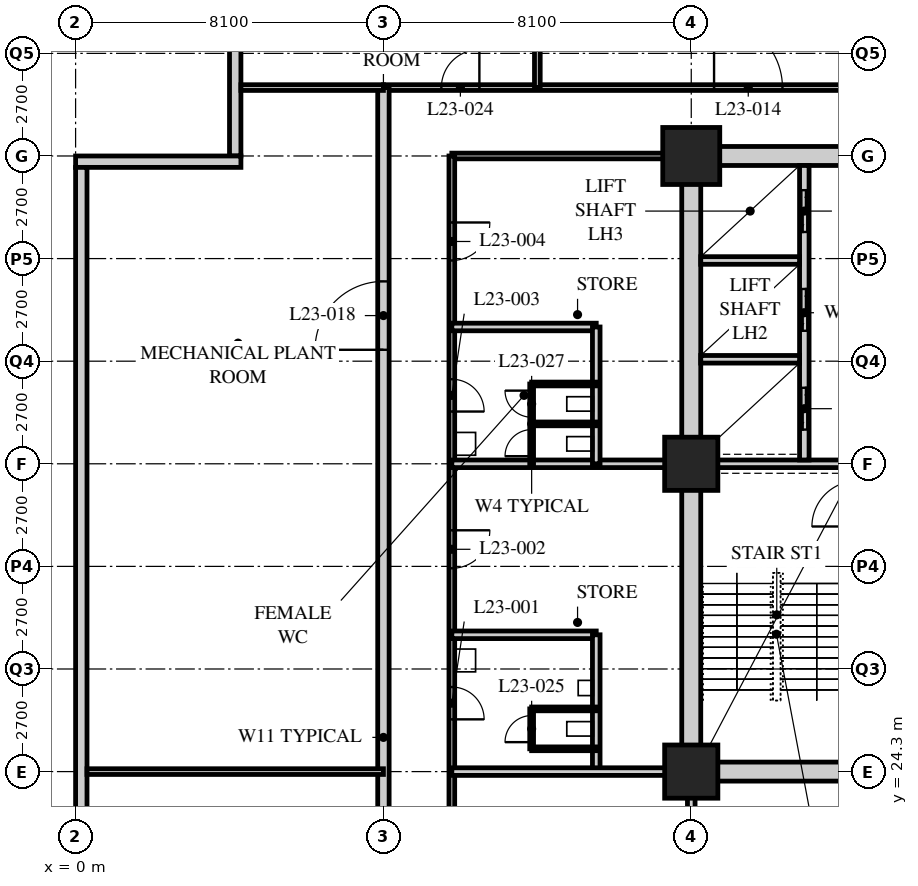
"""IFC4 building model, lengths in metres.
Left out: names, types, materials, properties, quantities, classifications, styles, units other than length and angle.
Written with IfcOpenShell. Run it as: python <this file> out.ifc"""

import sys

from ifc_helpers import new_model, si_unit, direction, frame, frame_2d, origin, origin_2d, place, context, subcontext, project, spatial, rectangle, hollow_rectangle, extrude, element, fill, save


model = new_model("IFC4")
c1 = context("Model", 3, precision=1e-05, world=origin(), true_north=direction((0.0, 1.0)))
c2 = subcontext(c1, "Body", "Model", "MODEL_VIEW")
j1 = project(units=[si_unit("LENGTHUNIT", "METRE"), si_unit("PLANEANGLEUNIT", "RADIAN")], contexts=[c1])
p1 = place(None, origin())
s1 = spatial("IfcSite", under=j1, at=p1, CompositionType="ELEMENT")
p2 = place(p1, origin())
s2 = spatial("IfcBuilding", under=s1, at=p2, CompositionType="ELEMENT")
p3 = place(p2, frame((0.0, 0.0, 90.8)))
s3 = spatial("IfcBuildingStorey", under=s2, at=p3, CompositionType="ELEMENT", Elevation=90.8)
for number, where, z_axis, x_axis in (
    (1, (16.2, 24.3, 0.0), (0.0, 0.0, 1.0), (1.0, 0.0, 0.0)),
    (2, (16.2, 32.4, 0.0), (0.0, 0.0, 1.0), (1.0, 0.0, 0.0)),
):
    element("IfcColumn", number, at=place(p3, frame(where, z_axis=z_axis, x_axis=x_axis)), inside=s3, PredefinedType="COLUMN", context=c2, shape_type="SweptSolid", body=[
        extrude(hollow_rectangle(XDim=1.4, YDim=1.4, WallThickness=0.12, at=origin_2d()), origin(), (0.0, 0.0, 1.0), 7.2),
    ])
p4 = place(p3, frame((16.2, 40.5, 0.0), z_axis=(0.0, 0.0, 1.0), x_axis=(1.0, 0.0, 0.0)))
e3 = element("IfcColumn", 3, at=p4, inside=s3, PredefinedType="COLUMN", context=c2, shape_type="SweptSolid", body=[
    extrude(hollow_rectangle(XDim=1.5, YDim=1.5, WallThickness=0.13, at=origin_2d()), origin(), (0.0, 0.0, 1.0), 7.2),
])
p5 = place(p3, frame((4.2, 44.25, 0.0), z_axis=(0.0, 0.0, 1.0), x_axis=(0.0, -1.0, 0.0)))
e4 = element("IfcWall", 4, at=p5, inside=s3, PredefinedType="SOLIDWALL", context=c2, shape_type="SweptSolid", body=[
    extrude(rectangle(XDim=3.75, YDim=0.3, at=frame_2d((1.875, 0.0))), origin(), (0.0, 0.0, 1.0), 6.95),
])
p6 = place(p3, frame((4.35, 40.35, 0.0), z_axis=(0.0, 0.0, 1.0), x_axis=(-1.0, 0.0, 0.0)))
e5 = element("IfcWall", 5, at=p6, inside=s3, PredefinedType="SOLIDWALL", context=c2, shape_type="SweptSolid", body=[
    extrude(rectangle(XDim=4.35, YDim=0.3, at=frame_2d((2.175, 0.0))), origin(), (0.0, 0.0, 1.0), 5.85),
])
p7 = place(p3, frame((0.15, 40.2, 0.0), z_axis=(0.0, 0.0, 1.0), x_axis=(0.0, -1.0, 0.0)))
e6 = element("IfcWall", 6, at=p7, inside=s3, PredefinedType="SOLIDWALL", context=c2, shape_type="SweptSolid", body=[
    extrude(rectangle(XDim=32.1, YDim=0.3, at=frame_2d((16.05, 0.0))), origin(), (0.0, 0.0, 1.0), 5.85),
])
p8 = place(p3, frame((8.1, 42.3, 0.0), z_axis=(0.0, 0.0, 1.0), x_axis=(1.0, 0.0, 0.0)))
e7 = element("IfcWall", 7, at=p8, inside=s3, PredefinedType="PARTITIONING", context=c2, shape_type="SweptSolid", body=[
    extrude(rectangle(XDim=40.5, YDim=0.15, at=frame_2d((20.25, 0.0))), origin(), (0.0, 0.0, 1.0), 6.95),
])
p9 = place(p8, frame((8.7, 0.0, 0.0)))
e8 = element("IfcOpeningElement", 8, at=p9, cuts=e7, PredefinedType="OPENING", context=c2, shape_type="SweptSolid", body=[
    extrude(rectangle(XDim=1.8, YDim=2.4, at=frame_2d((0.9, 1.2))), frame((0.0, 0.085, 0.0), z_axis=(0.0, -1.0, 0.0), x_axis=(1.0, 0.0, 0.0)), (0.0, 0.0, 1.0), 0.17),
])
p10 = place(p8, frame((19.35, 0.0, 0.0)))
e9 = element("IfcOpeningElement", 9, at=p10, cuts=e7, PredefinedType="OPENING", context=c2, shape_type="SweptSolid", body=[
    extrude(rectangle(XDim=1.8, YDim=2.4, at=frame_2d((0.9, 1.2))), frame((0.0, 0.085, 0.0), z_axis=(0.0, -1.0, 0.0), x_axis=(1.0, 0.0, 0.0)), (0.0, 0.0, 1.0), 0.17),
])
p11 = place(p8, frame((33.0, 0.0, 0.0)))
e10 = element("IfcOpeningElement", 10, at=p11, cuts=e7, PredefinedType="OPENING", context=c2, shape_type="SweptSolid", body=[
    extrude(rectangle(XDim=1.8, YDim=2.4, at=frame_2d((0.9, 1.2))), frame((0.0, 0.085, 0.0), z_axis=(0.0, -1.0, 0.0), x_axis=(1.0, 0.0, 0.0)), (0.0, 0.0, 1.0), 0.17),
])
p12 = place(p8, frame((37.975, 0.0, 0.0)))
e11 = element("IfcOpeningElement", 11, at=p12, cuts=e7, PredefinedType="OPENING", context=c2, shape_type="SweptSolid", body=[
    extrude(rectangle(XDim=1.0, YDim=2.1, at=frame_2d((0.5, 1.05))), frame((0.0, 0.085, 0.0), z_axis=(0.0, -1.0, 0.0), x_axis=(1.0, 0.0, 0.0)), (0.0, 0.0, 1.0), 0.17),
])
p13 = place(p8, frame((1.525, 0.0, 0.0)))
e12 = element("IfcOpeningElement", 12, at=p13, cuts=e7, PredefinedType="OPENING", context=c2, shape_type="SweptSolid", body=[
    extrude(rectangle(XDim=1.0, YDim=2.1, at=frame_2d((0.5, 1.05))), frame((0.0, 0.085, 0.0), z_axis=(0.0, -1.0, 0.0), x_axis=(1.0, 0.0, 0.0)), (0.0, 0.0, 1.0), 0.17),
])
p14 = place(p3, frame((8.1, 8.1, 0.0), z_axis=(0.0, 0.0, 1.0), x_axis=(0.0, 1.0, 0.0)))
e13 = element("IfcWall", 13, at=p14, inside=s3, PredefinedType="PARTITIONING", context=c2, shape_type="SweptSolid", body=[
    extrude(rectangle(XDim=34.2, YDim=0.3, at=frame_2d((17.1, 0.0))), origin(), (0.0, 0.0, 1.0), 5.85),
])
p15 = place(p14, frame((2.95, 0.0, 0.0)))
e14 = element("IfcOpeningElement", 14, at=p15, cuts=e13, PredefinedType="OPENING", context=c2, shape_type="SweptSolid", body=[
    extrude(rectangle(XDim=1.8, YDim=2.4, at=frame_2d((0.9, 1.2))), frame((0.0, 0.16, 0.0), z_axis=(0.0, -1.0, 0.0), x_axis=(1.0, 0.0, 0.0)), (0.0, 0.0, 1.0), 0.32),
])
p16 = place(p14, frame((27.3, 0.0, 0.0)))
e15 = element("IfcOpeningElement", 15, at=p16, cuts=e13, PredefinedType="OPENING", context=c2, shape_type="SweptSolid", body=[
    extrude(rectangle(XDim=1.8, YDim=2.4, at=frame_2d((0.9, 1.2))), frame((0.0, 0.16, 0.0), z_axis=(0.0, -1.0, 0.0), x_axis=(1.0, 0.0, 0.0)), (0.0, 0.0, 1.0), 0.32),
])
p17 = place(p3, frame((16.0, 40.5, 0.0), z_axis=(0.0, 0.0, 1.0), x_axis=(-1.0, 0.0, 0.0)))
e16 = element("IfcWall", 16, at=p17, inside=s3, PredefinedType="PARTITIONING", context=c2, shape_type="SweptSolid", body=[
    extrude(rectangle(XDim=6.1, YDim=0.15, at=frame_2d((3.05, 0.0))), origin(), (0.0, 0.0, 1.0), 5.85),
])
p18 = place(p3, frame((9.9, 40.5, 0.0), z_axis=(0.0, 0.0, 1.0), x_axis=(0.0, -1.0, 0.0)))
e17 = element("IfcWall", 17, at=p18, inside=s3, PredefinedType="PARTITIONING", context=c2, shape_type="SweptSolid", body=[
    extrude(rectangle(XDim=30.6, YDim=0.15, at=frame_2d((15.3, 0.0))), origin(), (0.0, 0.0, 1.0), 6.95),
])
p19 = place(p18, frame((13.975, 0.0, 0.0)))
e18 = element("IfcOpeningElement", 18, at=p19, cuts=e17, PredefinedType="OPENING", context=c2, shape_type="SweptSolid", body=[
    extrude(rectangle(XDim=0.85, YDim=2.1, at=frame_2d((0.425, 1.05))), frame((0.0, 0.085, 0.0), z_axis=(0.0, -1.0, 0.0), x_axis=(1.0, 0.0, 0.0)), (0.0, 0.0, 1.0), 0.17),
])
p20 = place(p18, frame((9.85, 0.0, 0.0)))
e19 = element("IfcOpeningElement", 19, at=p20, cuts=e17, PredefinedType="OPENING", context=c2, shape_type="SweptSolid", body=[
    extrude(rectangle(XDim=1.0, YDim=2.1, at=frame_2d((0.5, 1.05))), frame((0.0, 0.085, 0.0), z_axis=(0.0, -1.0, 0.0), x_axis=(1.0, 0.0, 0.0)), (0.0, 0.0, 1.0), 0.17),
])
p21 = place(p18, frame((5.875, 0.0, 0.0)))
e20 = element("IfcOpeningElement", 20, at=p21, cuts=e17, PredefinedType="OPENING", context=c2, shape_type="SweptSolid", body=[
    extrude(rectangle(XDim=0.85, YDim=2.1, at=frame_2d((0.425, 1.05))), frame((0.0, 0.085, 0.0), z_axis=(0.0, -1.0, 0.0), x_axis=(1.0, 0.0, 0.0)), (0.0, 0.0, 1.0), 0.17),
])
p22 = place(p18, frame((1.75, 0.0, 0.0)))
e21 = element("IfcOpeningElement", 21, at=p22, cuts=e17, PredefinedType="OPENING", context=c2, shape_type="SweptSolid", body=[
    extrude(rectangle(XDim=1.0, YDim=2.1, at=frame_2d((0.5, 1.05))), frame((0.0, 0.085, 0.0), z_axis=(0.0, -1.0, 0.0), x_axis=(1.0, 0.0, 0.0)), (0.0, 0.0, 1.0), 0.17),
])
p23 = place(p3, frame((9.9, 32.4, 0.0), z_axis=(0.0, 0.0, 1.0), x_axis=(1.0, 0.0, 0.0)))
e22 = element("IfcWall", 22, at=p23, inside=s3, PredefinedType="SOLIDWALL", context=c2, shape_type="SweptSolid", body=[
    extrude(rectangle(XDim=6.3, YDim=0.2, at=frame_2d((3.15, 0.0))), origin(), (0.0, 0.0, 1.0), 6.95),
])
p24 = place(p3, frame((9.9, 27.9, 0.0), z_axis=(0.0, 0.0, 1.0), x_axis=(1.0, 0.0, 0.0)))
e23 = element("IfcWall", 23, at=p24, inside=s3, PredefinedType="SOLIDWALL", context=c2, shape_type="SweptSolid", body=[
    extrude(rectangle(XDim=3.8, YDim=0.2, at=frame_2d((1.9, 0.0))), origin(), (0.0, 0.0, 1.0), 6.95),
])
p25 = place(p3, frame((13.7, 24.3, 0.0), z_axis=(0.0, 0.0, 1.0), x_axis=(0.0, 1.0, 0.0)))
e24 = element("IfcWall", 24, at=p25, inside=s3, PredefinedType="SOLIDWALL", context=c2, shape_type="SweptSolid", body=[
    extrude(rectangle(XDim=3.6, YDim=0.2, at=frame_2d((1.8, 0.0))), origin(), (0.0, 0.0, 1.0), 6.95),
])
p26 = place(p3, frame((9.9, 36.0, 0.0), z_axis=(0.0, 0.0, 1.0), x_axis=(1.0, 0.0, 0.0)))
e25 = element("IfcWall", 25, at=p26, inside=s3, PredefinedType="SOLIDWALL", context=c2, shape_type="SweptSolid", body=[
    extrude(rectangle(XDim=3.8, YDim=0.2, at=frame_2d((1.9, 0.0))), origin(), (0.0, 0.0, 1.0), 6.95),
])
p27 = place(p3, frame((13.7, 32.4, 0.0), z_axis=(0.0, 0.0, 1.0), x_axis=(0.0, 1.0, 0.0)))
e26 = element("IfcWall", 26, at=p27, inside=s3, PredefinedType="SOLIDWALL", context=c2, shape_type="SweptSolid", body=[
    extrude(rectangle(XDim=3.6, YDim=0.2, at=frame_2d((1.8, 0.0))), origin(), (0.0, 0.0, 1.0), 6.95),
])
p28 = place(p3, frame((16.2, 9.9, 0.0), z_axis=(0.0, 0.0, 1.0), x_axis=(0.0, 1.0, 0.0)))
e27 = element("IfcWall", 27, at=p28, inside=s3, PredefinedType="SOLIDWALL", context=c2, shape_type="SweptSolid", body=[
    extrude(rectangle(XDim=14.4, YDim=0.2, at=frame_2d((7.2, 0.0))), origin(), (0.0, 0.0, 1.0), 5.85),
])
p29 = place(p3, frame((9.9, 24.3, 0.0), z_axis=(0.0, 0.0, 1.0), x_axis=(1.0, 0.0, 0.0)))
e28 = element("IfcWall", 28, at=p29, inside=s3, PredefinedType="SOLIDWALL", context=c2, shape_type="SweptSolid", body=[
    extrude(rectangle(XDim=6.3, YDim=0.2, at=frame_2d((3.15, 0.0))), origin(), (0.0, 0.0, 1.0), 5.85),
])
p30 = place(p3, frame((8.1, 24.3, 0.0), z_axis=(0.0, 0.0, 1.0), x_axis=(-1.0, 0.0, 0.0)))
e29 = element("IfcWall", 29, at=p30, inside=s3, PredefinedType="PARTITIONING", context=c2, shape_type="SweptSolid", body=[
    extrude(rectangle(XDim=7.8, YDim=0.15, at=frame_2d((3.9, 0.0))), origin(), (0.0, 0.0, 1.0), 5.85),
])
p31 = place(p3, frame((4.35, 42.3, 0.0), z_axis=(0.0, 0.0, 1.0), x_axis=(1.0, 0.0, 0.0)))
e30 = element("IfcWall", 30, at=p31, inside=s3, PredefinedType="PARTITIONING", context=c2, shape_type="SweptSolid", body=[
    extrude(rectangle(XDim=3.75, YDim=0.15, at=frame_2d((1.875, 0.0))), origin(), (0.0, 0.0, 1.0), 6.95),
])
p32 = place(p3, frame((12.15, 42.3, 0.0), z_axis=(0.0, 0.0, 1.0), x_axis=(0.0, 1.0, 0.0)))
e31 = element("IfcWall", 31, at=p32, inside=s3, PredefinedType="PARTITIONING", context=c2, shape_type="SweptSolid", body=[
    extrude(rectangle(XDim=6.0, YDim=0.15, at=frame_2d((3.0, 0.0))), origin(), (0.0, 0.0, 1.0), 6.95),
])
p33 = place(p3, frame((12.0, 24.9, 0.0), z_axis=(0.0, 0.0, 1.0), x_axis=(0.0, 1.0, 0.0)))
e32 = element("IfcWall", 32, at=p33, inside=s3, PredefinedType="PARTITIONING", context=c2, shape_type="SweptSolid", body=[
    extrude(rectangle(XDim=1.05, YDim=0.1, at=frame_2d((0.525, 0.0))), origin(), (0.0, 0.0, 1.0), 6.95),
])
p34 = place(p33, frame((0.175, 0.0, 0.0)))
e33 = element("IfcOpeningElement", 33, at=p34, cuts=e32, PredefinedType="OPENING", context=c2, shape_type="SweptSolid", body=[
    extrude(rectangle(XDim=0.7, YDim=2.0, at=frame_2d((0.35, 1.0))), frame((0.0, 0.06, 0.0), z_axis=(0.0, -1.0, 0.0), x_axis=(1.0, 0.0, 0.0)), (0.0, 0.0, 1.0), 0.12),
])
for number, where, z_axis, x_axis in (
    (34, (12.0, 24.9, 0.0), (0.0, 0.0, 1.0), (1.0, 0.0, 0.0)),
    (35, (12.0, 25.95, 0.0), (0.0, 0.0, 1.0), (1.0, 0.0, 0.0)),
):
    element("IfcWall", number, at=place(p3, frame(where, z_axis=z_axis, x_axis=x_axis)), inside=s3, PredefinedType="PARTITIONING", context=c2, shape_type="SweptSolid", body=[
        extrude(rectangle(XDim=1.7, YDim=0.1, at=frame_2d((0.85, 0.0))), origin(), (0.0, 0.0, 1.0), 6.95),
    ])
p35 = place(p3, frame((12.0, 32.4, 0.0), z_axis=(0.0, 0.0, 1.0), x_axis=(0.0, 1.0, 0.0)))
e36 = element("IfcWall", 36, at=p35, inside=s3, PredefinedType="PARTITIONING", context=c2, shape_type="SweptSolid", body=[
    extrude(rectangle(XDim=2.1, YDim=0.1, at=frame_2d((1.05, 0.0))), origin(), (0.0, 0.0, 1.0), 6.95),
])
p36 = place(p35, frame((0.2, 0.0, 0.0)))
e37 = element("IfcOpeningElement", 37, at=p36, cuts=e36, PredefinedType="OPENING", context=c2, shape_type="SweptSolid", body=[
    extrude(rectangle(XDim=0.7, YDim=2.0, at=frame_2d((0.35, 1.0))), frame((0.0, 0.06, 0.0), z_axis=(0.0, -1.0, 0.0), x_axis=(1.0, 0.0, 0.0)), (0.0, 0.0, 1.0), 0.12),
])
p37 = place(p35, frame((1.225, 0.0, 0.0)))
e38 = element("IfcOpeningElement", 38, at=p37, cuts=e36, PredefinedType="OPENING", context=c2, shape_type="SweptSolid", body=[
    extrude(rectangle(XDim=0.7, YDim=2.0, at=frame_2d((0.35, 1.0))), frame((0.0, 0.06, 0.0), z_axis=(0.0, -1.0, 0.0), x_axis=(1.0, 0.0, 0.0)), (0.0, 0.0, 1.0), 0.12),
])
for number, where, z_axis, x_axis in (
    (39, (12.0, 33.45, 0.0), (0.0, 0.0, 1.0), (1.0, 0.0, 0.0)),
    (40, (12.0, 34.5, 0.0), (0.0, 0.0, 1.0), (1.0, 0.0, 0.0)),
):
    element("IfcWall", number, at=place(p3, frame(where, z_axis=z_axis, x_axis=x_axis)), inside=s3, PredefinedType="PARTITIONING", context=c2, shape_type="SweptSolid", body=[
        extrude(rectangle(XDim=1.7, YDim=0.1, at=frame_2d((0.85, 0.0))), origin(), (0.0, 0.0, 1.0), 6.95),
    ])
p38 = place(p3, frame((15.95, 24.3, 0.0), z_axis=(0.0, 0.0, 1.0), x_axis=(1.0, 0.0, 0.0)))
e41 = element("IfcWall", 41, at=p38, inside=s3, PredefinedType="SOLIDWALL", context=c2, shape_type="SweptSolid", body=[
    extrude(rectangle(XDim=24.8, YDim=0.5, at=frame_2d((12.4, 0.0))), origin(), (0.0, 0.0, 1.0), 6.188),
])
p39 = place(p38, frame((11.5, 0.0, 0.0)))
e42 = element("IfcOpeningElement", 42, at=p39, cuts=e41, PredefinedType="OPENING", context=c2, shape_type="SweptSolid", body=[
    extrude(rectangle(XDim=1.8, YDim=2.4, at=frame_2d((0.9, 1.2))), frame((0.0, 0.26, 0.0), z_axis=(0.0, -1.0, 0.0), x_axis=(1.0, 0.0, 0.0)), (0.0, 0.0, 1.0), 0.52),
])
p40 = place(p3, frame((15.95, 40.5, 0.0), z_axis=(0.0, 0.0, 1.0), x_axis=(1.0, 0.0, 0.0)))
e43 = element("IfcWall", 43, at=p40, inside=s3, PredefinedType="SOLIDWALL", context=c2, shape_type="SweptSolid", body=[
    extrude(rectangle(XDim=24.8, YDim=0.5, at=frame_2d((12.4, 0.0))), origin(), (0.0, 0.0, 1.0), 6.188),
])
p41 = place(p40, frame((11.5, 0.0, 0.0)))
e44 = element("IfcOpeningElement", 44, at=p41, cuts=e43, PredefinedType="OPENING", context=c2, shape_type="SweptSolid", body=[
    extrude(rectangle(XDim=1.8, YDim=2.4, at=frame_2d((0.9, 1.2))), frame((0.0, 0.26, 0.0), z_axis=(0.0, -1.0, 0.0), x_axis=(1.0, 0.0, 0.0)), (0.0, 0.0, 1.0), 0.52),
])
p42 = place(p3, frame((16.2, 24.55, 0.0), z_axis=(0.0, 0.0, 1.0), x_axis=(0.0, 1.0, 0.0)))
e45 = element("IfcWall", 45, at=p42, inside=s3, PredefinedType="SOLIDWALL", context=c2, shape_type="SweptSolid", body=[
    extrude(rectangle(XDim=15.7, YDim=0.5, at=frame_2d((7.85, 0.0))), origin(), (0.0, 0.0, 1.0), 5.85),
])
p43 = place(p3, frame((16.45, 32.4, 0.0), z_axis=(0.0, 0.0, 1.0), x_axis=(1.0, 0.0, 0.0)))
e46 = element("IfcWall", 46, at=p43, inside=s3, PredefinedType="SOLIDWALL", context=c2, shape_type="SweptSolid", body=[
    extrude(rectangle(XDim=7.95, YDim=0.2, at=frame_2d((3.975, 0.0))), origin(), (0.0, 0.0, 1.0), 6.25),
])
p44 = place(p3, frame((19.175, 32.5, 0.0), z_axis=(0.0, 0.0, 1.0), x_axis=(0.0, 1.0, 0.0)))
e47 = element("IfcWall", 47, at=p44, inside=s3, PredefinedType="SOLIDWALL", context=c2, shape_type="SweptSolid", body=[
    extrude(rectangle(XDim=7.75, YDim=0.25, at=frame_2d((3.875, 0.0))), origin(), (0.0, 0.0, 1.0), 6.95),
])
p45 = place(p44, frame((0.8, 0.0, 0.0)))
e48 = element("IfcOpeningElement", 48, at=p45, cuts=e47, PredefinedType="OPENING", context=c2, shape_type="SweptSolid", body=[
    extrude(rectangle(XDim=1.1, YDim=2.4, at=frame_2d((0.55, 1.2))), frame((0.0, 0.135, 0.0), z_axis=(0.0, -1.0, 0.0), x_axis=(1.0, 0.0, 0.0)), (0.0, 0.0, 1.0), 0.27),
])
p46 = place(p44, frame((3.4, 0.0, 0.0)))
e49 = element("IfcOpeningElement", 49, at=p46, cuts=e47, PredefinedType="OPENING", context=c2, shape_type="SweptSolid", body=[
    extrude(rectangle(XDim=1.1, YDim=2.4, at=frame_2d((0.55, 1.2))), frame((0.0, 0.135, 0.0), z_axis=(0.0, -1.0, 0.0), x_axis=(1.0, 0.0, 0.0)), (0.0, 0.0, 1.0), 0.27),
])
p47 = place(p44, frame((6.0, 0.0, 0.0)))
e50 = element("IfcOpeningElement", 50, at=p47, cuts=e47, PredefinedType="OPENING", context=c2, shape_type="SweptSolid", body=[
    extrude(rectangle(XDim=1.1, YDim=2.4, at=frame_2d((0.55, 1.2))), frame((0.0, 0.135, 0.0), z_axis=(0.0, -1.0, 0.0), x_axis=(1.0, 0.0, 0.0)), (0.0, 0.0, 1.0), 0.27),
])
for number, where, z_axis, x_axis in (
    (51, (16.45, 35.15, 0.0), (0.0, 0.0, 1.0), (1.0, 0.0, 0.0)),
    (52, (16.45, 37.75, 0.0), (0.0, 0.0, 1.0), (1.0, 0.0, 0.0)),
):
    element("IfcWall", number, at=place(p3, frame(where, z_axis=z_axis, x_axis=x_axis)), inside=s3, PredefinedType="SOLIDWALL", context=c2, shape_type="SweptSolid", body=[
        extrude(rectangle(XDim=2.6, YDim=0.2, at=frame_2d((1.3, 0.0))), origin(), (0.0, 0.0, 1.0), 6.95),
    ])
p48 = place(p19, origin())
e53 = element("IfcDoor", 53, at=p48, inside=s3, OperationType="SINGLE_SWING_RIGHT", PredefinedType="DOOR", context=c2, shape_type="SweptSolid", body=[
    extrude(rectangle(XDim=0.85, YDim=2.1, at=frame_2d((0.425, 1.05))), frame((0.0, 0.025, 0.0), z_axis=(0.0, -1.0, 0.0), x_axis=(1.0, 0.0, 0.0)), (0.0, 0.0, 1.0), 0.05),
])
fill(e18, e53)
p49 = place(p20, origin())
e54 = element("IfcDoor", 54, at=p49, inside=s3, OperationType="SINGLE_SWING_LEFT", PredefinedType="DOOR", context=c2, shape_type="SweptSolid", body=[
    extrude(rectangle(XDim=1.0, YDim=2.1, at=frame_2d((0.5, 1.05))), frame((0.0, 0.025, 0.0), z_axis=(0.0, -1.0, 0.0), x_axis=(1.0, 0.0, 0.0)), (0.0, 0.0, 1.0), 0.05),
])
fill(e19, e54)
p50 = place(p21, origin())
e55 = element("IfcDoor", 55, at=p50, inside=s3, OperationType="SINGLE_SWING_RIGHT", PredefinedType="DOOR", context=c2, shape_type="SweptSolid", body=[
    extrude(rectangle(XDim=0.85, YDim=2.1, at=frame_2d((0.425, 1.05))), frame((0.0, 0.025, 0.0), z_axis=(0.0, -1.0, 0.0), x_axis=(1.0, 0.0, 0.0)), (0.0, 0.0, 1.0), 0.05),
])
fill(e20, e55)
p51 = place(p22, origin())
e56 = element("IfcDoor", 56, at=p51, inside=s3, OperationType="SINGLE_SWING_LEFT", PredefinedType="DOOR", context=c2, shape_type="SweptSolid", body=[
    extrude(rectangle(XDim=1.0, YDim=2.1, at=frame_2d((0.5, 1.05))), frame((0.0, 0.025, 0.0), z_axis=(0.0, -1.0, 0.0), x_axis=(1.0, 0.0, 0.0)), (0.0, 0.0, 1.0), 0.05),
])
fill(e21, e56)
p52 = place(p9, origin())
e57 = element("IfcDoor", 57, at=p52, inside=s3, OperationType="DOUBLE_DOOR_SINGLE_SWING", PredefinedType="DOOR", context=c2, shape_type="SweptSolid", body=[
    extrude(rectangle(XDim=1.8, YDim=2.4, at=frame_2d((0.9, 1.2))), frame((0.0, 0.025, 0.0), z_axis=(0.0, -1.0, 0.0), x_axis=(1.0, 0.0, 0.0)), (0.0, 0.0, 1.0), 0.05),
])
fill(e8, e57)
p53 = place(p16, origin())
e58 = element("IfcDoor", 58, at=p53, inside=s3, OperationType="DOUBLE_DOOR_SINGLE_SWING", PredefinedType="DOOR", context=c2, shape_type="SweptSolid", body=[
    extrude(rectangle(XDim=1.8, YDim=2.4, at=frame_2d((0.9, 1.2))), frame((0.0, 0.025, 0.0), z_axis=(0.0, -1.0, 0.0), x_axis=(1.0, 0.0, 0.0)), (0.0, 0.0, 1.0), 0.05),
])
fill(e15, e58)
p54 = place(p13, origin())
e59 = element("IfcDoor", 59, at=p54, inside=s3, OperationType="SINGLE_SWING_RIGHT", PredefinedType="DOOR", context=c2, shape_type="SweptSolid", body=[
    extrude(rectangle(XDim=1.0, YDim=2.1, at=frame_2d((0.5, 1.05))), frame((0.0, 0.025, 0.0), z_axis=(0.0, -1.0, 0.0), x_axis=(1.0, 0.0, 0.0)), (0.0, 0.0, 1.0), 0.05),
])
fill(e12, e59)
p55 = place(p34, origin())
e60 = element("IfcDoor", 60, at=p55, inside=s3, OperationType="SINGLE_SWING_LEFT", PredefinedType="DOOR", context=c2, shape_type="SweptSolid", body=[
    extrude(rectangle(XDim=0.7, YDim=2.0, at=frame_2d((0.35, 1.0))), frame((0.0, 0.025, 0.0), z_axis=(0.0, -1.0, 0.0), x_axis=(1.0, 0.0, 0.0)), (0.0, 0.0, 1.0), 0.05),
])
fill(e33, e60)
p56 = place(p36, origin())
e61 = element("IfcDoor", 61, at=p56, inside=s3, OperationType="SINGLE_SWING_LEFT", PredefinedType="DOOR", context=c2, shape_type="SweptSolid", body=[
    extrude(rectangle(XDim=0.7, YDim=2.0, at=frame_2d((0.35, 1.0))), frame((0.0, 0.025, 0.0), z_axis=(0.0, -1.0, 0.0), x_axis=(1.0, 0.0, 0.0)), (0.0, 0.0, 1.0), 0.05),
])
fill(e37, e61)
p57 = place(p37, origin())
e62 = element("IfcDoor", 62, at=p57, inside=s3, OperationType="SINGLE_SWING_RIGHT", PredefinedType="DOOR", context=c2, shape_type="SweptSolid", body=[
    extrude(rectangle(XDim=0.7, YDim=2.0, at=frame_2d((0.35, 1.0))), frame((0.0, 0.025, 0.0), z_axis=(0.0, -1.0, 0.0), x_axis=(1.0, 0.0, 0.0)), (0.0, 0.0, 1.0), 0.05),
])
fill(e38, e62)
p58 = place(p45, origin())
e63 = element("IfcDoor", 63, at=p58, inside=s3, OperationType="DOUBLE_DOOR_SLIDING", PredefinedType="DOOR", context=c2, shape_type="SweptSolid", body=[
    extrude(rectangle(XDim=1.1, YDim=2.4, at=frame_2d((0.55, 1.2))), frame((0.0, 0.025, 0.0), z_axis=(0.0, -1.0, 0.0), x_axis=(1.0, 0.0, 0.0)), (0.0, 0.0, 1.0), 0.05),
])
fill(e48, e63)
p59 = place(p46, origin())
e64 = element("IfcDoor", 64, at=p59, inside=s3, OperationType="DOUBLE_DOOR_SLIDING", PredefinedType="DOOR", context=c2, shape_type="SweptSolid", body=[
    extrude(rectangle(XDim=1.1, YDim=2.4, at=frame_2d((0.55, 1.2))), frame((0.0, 0.025, 0.0), z_axis=(0.0, -1.0, 0.0), x_axis=(1.0, 0.0, 0.0)), (0.0, 0.0, 1.0), 0.05),
])
fill(e49, e64)
p60 = place(p47, origin())
e65 = element("IfcDoor", 65, at=p60, inside=s3, OperationType="DOUBLE_DOOR_SLIDING", PredefinedType="DOOR", context=c2, shape_type="SweptSolid", body=[
    extrude(rectangle(XDim=1.1, YDim=2.4, at=frame_2d((0.55, 1.2))), frame((0.0, 0.025, 0.0), z_axis=(0.0, -1.0, 0.0), x_axis=(1.0, 0.0, 0.0)), (0.0, 0.0, 1.0), 0.05),
])
fill(e50, e65)
save(model, sys.argv[1])
